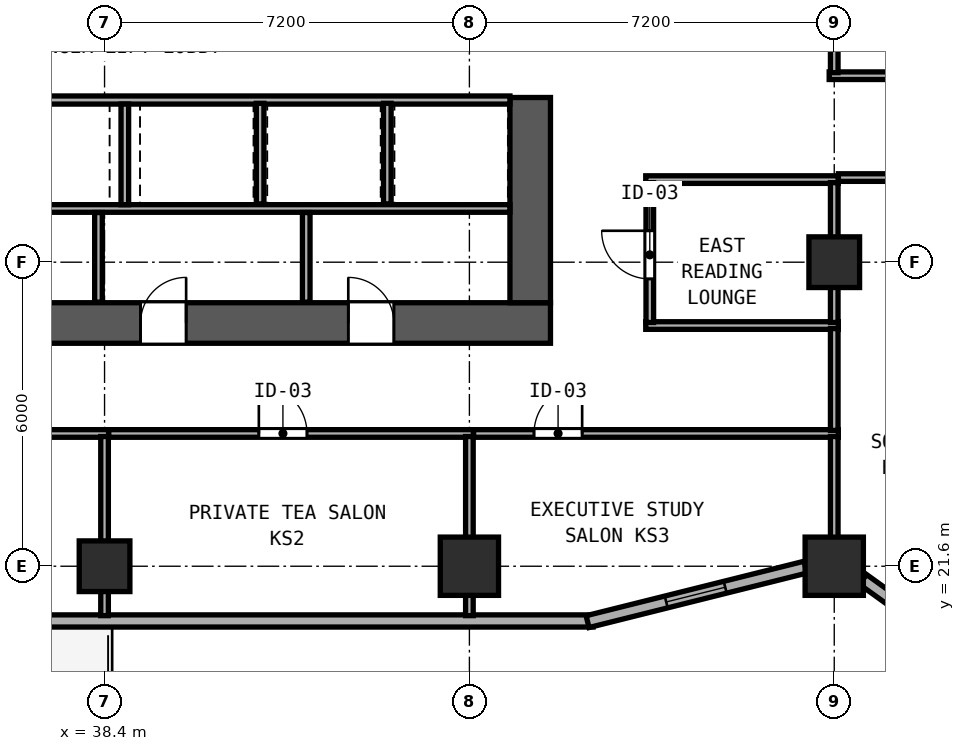
"""IFC4 building model, lengths in metres.
Left out: names, types, materials, properties, quantities, classifications, styles, units other than length and angle.
Written with IfcOpenShell. Run it as: python <this file> out.ifc"""

import sys

from ifc_helpers import new_model, si_unit, direction, frame, frame_2d, origin, origin_2d, place, context, subcontext, project, spatial, rectangle, hollow_rectangle, extrude, element, fill, save


model = new_model("IFC4")
c1 = context("Model", 3, precision=1e-05, world=origin(), true_north=direction((0.0, 1.0)))
c2 = subcontext(c1, "Body", "Model", "MODEL_VIEW")
j1 = project(units=[si_unit("LENGTHUNIT", "METRE"), si_unit("PLANEANGLEUNIT", "RADIAN")], contexts=[c1])
p1 = place(None, origin())
s1 = spatial("IfcSite", under=j1, at=p1, CompositionType="ELEMENT")
p2 = place(p1, origin())
s2 = spatial("IfcBuilding", under=s1, at=p2, CompositionType="ELEMENT")
p3 = place(p2, frame((0.0, 0.0, 55.2)))
s3 = spatial("IfcBuildingStorey", under=s2, at=p3, CompositionType="ELEMENT", Elevation=55.2)
p4 = place(p3, frame((29.6, 26.4, 0.0), z_axis=(0.0, 0.0, 1.0), x_axis=(1.0, 0.0, 0.0)))
e1 = element("IfcWall", 1, at=p4, inside=s3, PredefinedType="SHEAR", context=c2, shape_type="SweptSolid", body=[
    extrude(rectangle(XDim=17.6, YDim=0.8, at=frame_2d((8.8, 0.0))), origin(), (0.0, 0.0, 1.0), 3.6),
])
p5 = place(p4, frame((2.47, 0.0, 0.0), z_axis=(0.0, 0.0, 1.0), x_axis=(-1.0, 0.0, 0.0)))
e2 = element("IfcOpeningElement", 2, at=p5, cuts=e1, PredefinedType="OPENING", context=c2, shape_type="SweptSolid", body=[
    extrude(rectangle(XDim=0.9, YDim=2.1, at=frame_2d((0.45, 1.05))), frame((0.0, 0.41, 0.0), z_axis=(0.0, -1.0, 0.0), x_axis=(1.0, 0.0, 0.0)), (0.0, 0.0, 1.0), 0.82),
])
p6 = place(p4, frame((6.31, 0.0, 0.0), z_axis=(0.0, 0.0, 1.0), x_axis=(-1.0, 0.0, 0.0)))
e3 = element("IfcOpeningElement", 3, at=p6, cuts=e1, PredefinedType="OPENING", context=c2, shape_type="SweptSolid", body=[
    extrude(rectangle(XDim=0.9, YDim=2.1, at=frame_2d((0.45, 1.05))), frame((0.0, 0.41, 0.0), z_axis=(0.0, -1.0, 0.0), x_axis=(1.0, 0.0, 0.0)), (0.0, 0.0, 1.0), 0.82),
])
p7 = place(p4, frame((10.41, 0.0, 0.0), z_axis=(0.0, 0.0, 1.0), x_axis=(-1.0, 0.0, 0.0)))
e4 = element("IfcOpeningElement", 4, at=p7, cuts=e1, PredefinedType="OPENING", context=c2, shape_type="SweptSolid", body=[
    extrude(rectangle(XDim=0.9, YDim=2.1, at=frame_2d((0.45, 1.05))), frame((0.0, 0.41, 0.0), z_axis=(0.0, -1.0, 0.0), x_axis=(1.0, 0.0, 0.0)), (0.0, 0.0, 1.0), 0.82),
])
p8 = place(p4, frame((14.51, 0.0, 0.0), z_axis=(0.0, 0.0, 1.0), x_axis=(-1.0, 0.0, 0.0)))
e5 = element("IfcOpeningElement", 5, at=p8, cuts=e1, PredefinedType="OPENING", context=c2, shape_type="SweptSolid", body=[
    extrude(rectangle(XDim=0.9, YDim=2.1, at=frame_2d((0.45, 1.05))), frame((0.0, 0.41, 0.0), z_axis=(0.0, -1.0, 0.0), x_axis=(1.0, 0.0, 0.0)), (0.0, 0.0, 1.0), 0.82),
])
p9 = place(p3, frame((46.8, 26.8, 0.0), z_axis=(0.0, 0.0, 1.0), x_axis=(0.0, 1.0, 0.0)))
e6 = element("IfcWall", 6, at=p9, inside=s3, PredefinedType="SHEAR", context=c2, shape_type="SweptSolid", body=[
    extrude(rectangle(XDim=4.05, YDim=0.8, at=frame_2d((2.025, 0.0))), origin(), (0.0, 0.0, 1.0), 3.6),
])
for number, where, z_axis, x_axis in (
    (7, (52.8, 21.6, 0.0), (0.0, 0.0, 1.0), (1.0, 0.0, 0.0)),
    (8, (45.6, 21.6, 0.0), (0.0, 0.0, 1.0), (1.0, 0.0, 0.0)),
):
    element("IfcColumn", number, at=place(p3, frame(where, z_axis=z_axis, x_axis=x_axis)), inside=s3, PredefinedType="COLUMN", context=c2, shape_type="SweptSolid", body=[
        extrude(hollow_rectangle(XDim=1.15, YDim=1.15, WallThickness=0.042, at=origin_2d()), origin(), (0.0, 0.0, 1.0), 3.8),
    ])
for number, where, z_axis, x_axis in (
    (9, (52.8, 27.6, 0.0), (0.0, 0.0, 1.0), (1.0, 0.0, 0.0)),
    (10, (38.4, 21.6, 0.0), (0.0, 0.0, 1.0), (1.0, 0.0, 0.0)),
):
    element("IfcColumn", number, at=place(p3, frame(where, z_axis=z_axis, x_axis=x_axis)), inside=s3, PredefinedType="COLUMN", context=c2, shape_type="SweptSolid", body=[
        extrude(hollow_rectangle(XDim=1.0, YDim=1.0, WallThickness=0.038, at=origin_2d()), origin(), (0.0, 0.0, 1.0), 3.8),
    ])
p10 = place(p3, frame((28.76, 20.52, 0.0), z_axis=(0.0, 0.0, 1.0), x_axis=(1.0, 0.0, 0.0)))
e11 = element("IfcWall", 11, at=p10, inside=s3, PredefinedType="SOLIDWALL", context=c2, shape_type="SweptSolid", body=[
    extrude(rectangle(XDim=19.281, YDim=0.24, at=frame_2d((9.64, 0.0))), origin(), (0.0, 0.0, 1.0), 3.6),
])
p11 = place(p10, frame((4.84, 0.0, 0.0), z_axis=(0.0, 0.0, 1.0), x_axis=(-1.0, 0.0, 0.0)))
e12 = element("IfcOpeningElement", 12, at=p11, cuts=e11, PredefinedType="OPENING", context=c2, shape_type="SweptSolid", body=[
    extrude(rectangle(XDim=1.2, YDim=2.15, at=frame_2d((0.6, 1.075))), frame((0.0, 0.13, 0.0), z_axis=(0.0, -1.0, 0.0), x_axis=(1.0, 0.0, 0.0)), (0.0, 0.0, 1.0), 0.26),
])
p12 = place(p3, frame((47.932, 20.507, 0.0), z_axis=(0.0, 0.0, 1.0), x_axis=(0.970145739396, 0.242522667667, 0.0)))
e13 = element("IfcWall", 13, at=p12, inside=s3, PredefinedType="SOLIDWALL", context=c2, shape_type="SweptSolid", body=[
    extrude(rectangle(XDim=4.433, YDim=0.24, at=frame_2d((2.217, 0.0))), origin(), (0.0, 0.0, 1.0), 3.097),
])
p13 = place(p12, frame((1.6, 0.0, 0.85)))
e14 = element("IfcOpeningElement", 14, at=p13, cuts=e13, PredefinedType="OPENING", context=c2, shape_type="SweptSolid", body=[
    extrude(rectangle(XDim=1.2, YDim=1.85, at=frame_2d((0.6, 0.925))), frame((0.0, 0.13, 0.0), z_axis=(0.0, -1.0, 0.0), x_axis=(1.0, 0.0, 0.0)), (0.0, 0.0, 1.0), 0.26),
])
p14 = place(p3, frame((53.367, 21.34, 0.0), z_axis=(0.0, 0.0, 1.0), x_axis=(0.811543176492, -0.58429245476, 0.0)))
e15 = element("IfcWall", 15, at=p14, inside=s3, PredefinedType="SOLIDWALL", context=c2, shape_type="SweptSolid", body=[
    extrude(rectangle(XDim=11.531, YDim=0.24, at=frame_2d((5.765, 0.0))), origin(), (0.0, 0.0, 1.0), 3.097),
])
p15 = place(p14, frame((1.6, 0.0, 0.85)))
e16 = element("IfcOpeningElement", 16, at=p15, cuts=e15, PredefinedType="OPENING", context=c2, shape_type="SweptSolid", body=[
    extrude(rectangle(XDim=1.2, YDim=1.85, at=frame_2d((0.6, 0.925))), frame((0.0, 0.13, 0.0), z_axis=(0.0, -1.0, 0.0), x_axis=(1.0, 0.0, 0.0)), (0.0, 0.0, 1.0), 0.26),
])
p16 = place(p14, frame((7.0, 0.0, 0.85)))
e17 = element("IfcOpeningElement", 17, at=p16, cuts=e15, PredefinedType="OPENING", context=c2, shape_type="SweptSolid", body=[
    extrude(rectangle(XDim=1.2, YDim=1.85, at=frame_2d((0.6, 0.925))), frame((0.0, 0.13, 0.0), z_axis=(0.0, -1.0, 0.0), x_axis=(1.0, 0.0, 0.0)), (0.0, 0.0, 1.0), 0.26),
])
p17 = place(p14, frame((9.99, 0.0, 0.85)))
e18 = element("IfcOpeningElement", 18, at=p17, cuts=e15, PredefinedType="OPENING", context=c2, shape_type="SweptSolid", body=[
    extrude(rectangle(XDim=1.2, YDim=1.85, at=frame_2d((0.6, 0.925))), frame((0.0, 0.13, 0.0), z_axis=(0.0, -1.0, 0.0), x_axis=(1.0, 0.0, 0.0)), (0.0, 0.0, 1.0), 0.26),
])
p18 = place(p3, frame((30.4, 30.8, 0.0), z_axis=(0.0, 0.0, 1.0), x_axis=(1.0, 0.0, 0.0)))
e19 = element("IfcWall", 19, at=p18, inside=s3, PredefinedType="SOLIDWALL", context=c2, shape_type="SweptSolid", body=[
    extrude(rectangle(XDim=16.0, YDim=0.16, at=frame_2d((8.0, 0.0))), origin(), (0.0, 0.0, 1.0), 3.6),
])
p19 = place(p3, frame((30.4, 28.66, 0.0), z_axis=(0.0, 0.0, 1.0), x_axis=(1.0, 0.0, 0.0)))
e20 = element("IfcWall", 20, at=p19, inside=s3, PredefinedType="PARTITIONING", context=c2, shape_type="SweptSolid", body=[
    extrude(rectangle(XDim=16.0, YDim=0.15, at=frame_2d((8.0, 0.0))), origin(), (0.0, 0.0, 1.0), 3.6),
])
p20 = place(p3, frame((38.8, 28.735, 0.0), z_axis=(0.0, 0.0, 1.0), x_axis=(0.0, 1.0, 0.0)))
e21 = element("IfcWall", 21, at=p20, inside=s3, PredefinedType="SOLIDWALL", context=c2, shape_type="SweptSolid", body=[
    extrude(rectangle(XDim=1.985, YDim=0.15, at=frame_2d((0.992, 0.0))), origin(), (0.0, 0.0, 1.0), 3.6),
])
for number, where, z_axis, x_axis in (
    (22, (38.28, 26.81, 0.0), (0.0, 0.0, 1.0), (0.0, 1.0, 0.0)),
    (23, (42.38, 26.81, 0.0), (0.0, 0.0, 1.0), (0.0, 1.0, 0.0)),
):
    element("IfcWall", number, at=place(p3, frame(where, z_axis=z_axis, x_axis=x_axis)), inside=s3, PredefinedType="PARTITIONING", context=c2, shape_type="SweptSolid", body=[
        extrude(rectangle(XDim=1.77, YDim=0.15, at=frame_2d((0.885, 0.0))), origin(), (0.0, 0.0, 1.0), 3.6),
    ])
for number, where, z_axis, x_axis in (
    (24, (41.47, 28.75, 0.0), (0.0, 0.0, 1.0), (0.0, 1.0, 0.0)),
    (25, (43.98, 28.75, 0.0), (0.0, 0.0, 1.0), (0.0, 1.0, 0.0)),
):
    element("IfcWall", number, at=place(p3, frame(where, z_axis=z_axis, x_axis=x_axis)), inside=s3, PredefinedType="SOLIDWALL", context=c2, shape_type="SweptSolid", body=[
        extrude(rectangle(XDim=1.985, YDim=0.15, at=frame_2d((0.993, 0.0))), origin(), (0.0, 0.0, 1.0), 3.6),
    ])
for number, where, z_axis, x_axis in (
    (26, (49.08, 29.23, 0.0), (0.0, 0.0, 1.0), (1.0, 0.0, 0.0)),
    (27, (49.08, 26.35, 0.0), (0.0, 0.0, 1.0), (1.0, 0.0, 0.0)),
):
    element("IfcWall", number, at=place(p3, frame(where, z_axis=z_axis, x_axis=x_axis)), inside=s3, PredefinedType="PARTITIONING", context=c2, shape_type="SweptSolid", body=[
        extrude(rectangle(XDim=3.8, YDim=0.15, at=frame_2d((1.9, 0.0))), origin(), (0.0, 0.0, 1.0), 3.6),
    ])
p21 = place(p3, frame((49.16, 26.41, 0.0), z_axis=(0.0, 0.0, 1.0), x_axis=(0.0, 1.0, 0.0)))
e28 = element("IfcWall", 28, at=p21, inside=s3, PredefinedType="PARTITIONING", context=c2, shape_type="SweptSolid", body=[
    extrude(rectangle(XDim=2.76, YDim=0.15, at=frame_2d((1.38, 0.0))), origin(), (0.0, 0.0, 1.0), 3.6),
])
p22 = place(p21, frame((0.86, 0.0, 0.0)))
e29 = element("IfcOpeningElement", 29, at=p22, cuts=e28, PredefinedType="OPENING", context=c2, shape_type="SweptSolid", body=[
    extrude(rectangle(XDim=0.95, YDim=2.12, at=frame_2d((0.475, 1.06))), frame((0.0, 0.085, 0.0), z_axis=(0.0, -1.0, 0.0), x_axis=(1.0, 0.0, 0.0)), (0.0, 0.0, 1.0), 0.17),
])
p23 = place(p3, frame((52.8, 26.41, 0.0), z_axis=(0.0, 0.0, 1.0), x_axis=(0.0, 1.0, 0.0)))
e30 = element("IfcWall", 30, at=p23, inside=s3, PredefinedType="PARTITIONING", context=c2, shape_type="SweptSolid", body=[
    extrude(rectangle(XDim=2.76, YDim=0.15, at=frame_2d((1.38, 0.0))), origin(), (0.0, 0.0, 1.0), 3.097),
])
p24 = place(p3, frame((23.92, 24.22, 0.0), z_axis=(0.0, 0.0, 1.0), x_axis=(1.0, 0.0, 0.0)))
e31 = element("IfcWall", 31, at=p24, inside=s3, PredefinedType="PARTITIONING", context=c2, shape_type="SweptSolid", body=[
    extrude(rectangle(XDim=14.56, YDim=0.15, at=frame_2d((7.28, 0.0))), origin(), (0.0, 0.0, 1.0), 3.6),
])
p25 = place(p24, frame((9.445, 0.0, 0.0), z_axis=(0.0, 0.0, 1.0), x_axis=(-1.0, 0.0, 0.0)))
e32 = element("IfcOpeningElement", 32, at=p25, cuts=e31, PredefinedType="OPENING", context=c2, shape_type="SweptSolid", body=[
    extrude(rectangle(XDim=0.95, YDim=2.12, at=frame_2d((0.475, 1.06))), frame((0.0, 0.085, 0.0), z_axis=(0.0, -1.0, 0.0), x_axis=(1.0, 0.0, 0.0)), (0.0, 0.0, 1.0), 0.17),
])
p26 = place(p3, frame((38.4, 20.625, 0.0), z_axis=(0.0, 0.0, 1.0), x_axis=(0.0, 1.0, 0.0)))
e33 = element("IfcWall", 33, at=p26, inside=s3, PredefinedType="PARTITIONING", context=c2, shape_type="SweptSolid", body=[
    extrude(rectangle(XDim=3.535, YDim=0.15, at=frame_2d((1.768, 0.0))), origin(), (0.0, 0.0, 1.0), 2.985),
])
p27 = place(p3, frame((38.482, 24.22, 0.0), z_axis=(0.0, 0.0, 1.0), x_axis=(1.0, 0.0, 0.0)))
e34 = element("IfcWall", 34, at=p27, inside=s3, PredefinedType="PARTITIONING", context=c2, shape_type="SweptSolid", body=[
    extrude(rectangle(XDim=7.198, YDim=0.15, at=frame_2d((3.599, 0.0))), origin(), (0.0, 0.0, 1.0), 3.6),
])
p28 = place(p27, frame((3.913, 0.0, 0.0), z_axis=(0.0, 0.0, 1.0), x_axis=(-1.0, 0.0, 0.0)))
e35 = element("IfcOpeningElement", 35, at=p28, cuts=e34, PredefinedType="OPENING", context=c2, shape_type="SweptSolid", body=[
    extrude(rectangle(XDim=0.95, YDim=2.12, at=frame_2d((0.475, 1.06))), frame((0.0, 0.085, 0.0), z_axis=(0.0, -1.0, 0.0), x_axis=(1.0, 0.0, 0.0)), (0.0, 0.0, 1.0), 0.17),
])
p29 = place(p3, frame((45.6, 20.625, 0.0), z_axis=(0.0, 0.0, 1.0), x_axis=(0.0, 1.0, 0.0)))
e36 = element("IfcWall", 36, at=p29, inside=s3, PredefinedType="PARTITIONING", context=c2, shape_type="SweptSolid", body=[
    extrude(rectangle(XDim=3.535, YDim=0.15, at=frame_2d((1.768, 0.0))), origin(), (0.0, 0.0, 1.0), 2.985),
])
p30 = place(p3, frame((45.682, 24.22, 0.0), z_axis=(0.0, 0.0, 1.0), x_axis=(1.0, 0.0, 0.0)))
e37 = element("IfcWall", 37, at=p30, inside=s3, PredefinedType="PARTITIONING", context=c2, shape_type="SweptSolid", body=[
    extrude(rectangle(XDim=7.198, YDim=0.15, at=frame_2d((3.599, 0.0))), origin(), (0.0, 0.0, 1.0), 3.6),
])
p31 = place(p30, frame((2.143, 0.0, 0.0), z_axis=(0.0, 0.0, 1.0), x_axis=(-1.0, 0.0, 0.0)))
e38 = element("IfcOpeningElement", 38, at=p31, cuts=e37, PredefinedType="OPENING", context=c2, shape_type="SweptSolid", body=[
    extrude(rectangle(XDim=0.95, YDim=2.12, at=frame_2d((0.475, 1.06))), frame((0.0, 0.085, 0.0), z_axis=(0.0, -1.0, 0.0), x_axis=(1.0, 0.0, 0.0)), (0.0, 0.0, 1.0), 0.17),
])
p32 = place(p3, frame((52.8, 21.819, 0.0), z_axis=(0.0, 0.0, 1.0), x_axis=(0.0, 1.0, 0.0)))
e39 = element("IfcWall", 39, at=p32, inside=s3, PredefinedType="PARTITIONING", context=c2, shape_type="SweptSolid", body=[
    extrude(rectangle(XDim=2.341, YDim=0.15, at=frame_2d((1.171, 0.0))), origin(), (0.0, 0.0, 1.0), 3.097),
])
p33 = place(p3, frame((52.7, 31.28, 0.0), z_axis=(0.0, 0.0, 1.0), x_axis=(1.0, 0.0, 0.0)))
e40 = element("IfcWall", 40, at=p33, inside=s3, PredefinedType="PARTITIONING", context=c2, shape_type="SweptSolid", body=[
    extrude(rectangle(XDim=4.59, YDim=0.15, at=frame_2d((2.295, 0.0))), origin(), (0.0, 0.0, 1.0), 3.6),
])
p34 = place(p33, frame((3.361, 0.0, 0.0)))
e41 = element("IfcOpeningElement", 41, at=p34, cuts=e40, PredefinedType="OPENING", context=c2, shape_type="SweptSolid", body=[
    extrude(rectangle(XDim=0.95, YDim=2.15, at=frame_2d((0.475, 1.075))), frame((0.0, 0.085, 0.0), z_axis=(0.0, -1.0, 0.0), x_axis=(1.0, 0.0, 0.0)), (0.0, 0.0, 1.0), 0.17),
])
p35 = place(p3, frame((52.8, 31.34, 0.0), z_axis=(0.0, 0.0, 1.0), x_axis=(0.0, 1.0, 0.0)))
e42 = element("IfcWall", 42, at=p35, inside=s3, PredefinedType="PARTITIONING", context=c2, shape_type="SweptSolid", body=[
    extrude(rectangle(XDim=1.6, YDim=0.15, at=frame_2d((0.8, 0.0))), origin(), (0.0, 0.0, 1.0), 3.097),
])
p36 = place(p3, frame((52.882, 29.27, 0.0), z_axis=(0.0, 0.0, 1.0), x_axis=(1.0, 0.0, 0.0)))
e43 = element("IfcWall", 43, at=p36, inside=s3, PredefinedType="PARTITIONING", context=c2, shape_type="SweptSolid", body=[
    extrude(rectangle(XDim=4.288, YDim=0.15, at=frame_2d((2.144, 0.0))), origin(), (0.0, 0.0, 1.0), 3.6),
])
p37 = place(p36, frame((4.02, 0.0, 0.0), z_axis=(0.0, 0.0, 1.0), x_axis=(-1.0, 0.0, 0.0)))
e44 = element("IfcOpeningElement", 44, at=p37, cuts=e43, PredefinedType="OPENING", context=c2, shape_type="SweptSolid", body=[
    extrude(rectangle(XDim=0.95, YDim=2.15, at=frame_2d((0.475, 1.075))), frame((0.0, 0.085, 0.0), z_axis=(0.0, -1.0, 0.0), x_axis=(1.0, 0.0, 0.0)), (0.0, 0.0, 1.0), 0.17),
])
p38 = place(p3, frame((52.8, 24.28, 0.0), z_axis=(0.0, 0.0, 1.0), x_axis=(0.0, 1.0, 0.0)))
e45 = element("IfcWall", 45, at=p38, inside=s3, PredefinedType="PARTITIONING", context=c2, shape_type="SweptSolid", body=[
    extrude(rectangle(XDim=2.01, YDim=0.15, at=frame_2d((1.005, 0.0))), origin(), (0.0, 0.0, 1.0), 3.097),
])
p39 = place(p13, origin())
e46 = element("IfcWindow", 46, at=p39, inside=s3, PartitioningType="SINGLE_PANEL", PredefinedType="WINDOW", context=c2, shape_type="SweptSolid", body=[
    extrude(rectangle(XDim=1.2, YDim=1.85, at=frame_2d((0.6, 0.925))), frame((0.0, 0.03, 0.0), z_axis=(0.0, -1.0, 0.0), x_axis=(1.0, 0.0, 0.0)), (0.0, 0.0, 1.0), 0.06),
])
fill(e14, e46)
p40 = place(p7, origin())
e47 = element("IfcDoor", 47, at=p40, inside=s3, OperationType="SINGLE_SWING_LEFT", PredefinedType="DOOR", context=c2, shape_type="SweptSolid", body=[
    extrude(rectangle(XDim=0.9, YDim=2.1, at=frame_2d((0.45, 1.05))), frame((0.0, -0.195, 0.0), z_axis=(0.0, -1.0, 0.0), x_axis=(1.0, 0.0, 0.0)), (0.0, 0.0, 1.0), 0.05),
])
fill(e4, e47)
p41 = place(p8, origin())
e48 = element("IfcDoor", 48, at=p41, inside=s3, OperationType="SINGLE_SWING_RIGHT", PredefinedType="DOOR", context=c2, shape_type="SweptSolid", body=[
    extrude(rectangle(XDim=0.9, YDim=2.1, at=frame_2d((0.45, 1.05))), frame((0.0, -0.195, 0.0), z_axis=(0.0, -1.0, 0.0), x_axis=(1.0, 0.0, 0.0)), (0.0, 0.0, 1.0), 0.05),
])
fill(e5, e48)
p42 = place(p22, origin())
e49 = element("IfcDoor", 49, at=p42, inside=s3, OperationType="SINGLE_SWING_RIGHT", PredefinedType="DOOR", context=c2, shape_type="SweptSolid", body=[
    extrude(rectangle(XDim=0.95, YDim=2.12, at=frame_2d((0.475, 1.06))), frame((0.0, 0.025, 0.0), z_axis=(0.0, -1.0, 0.0), x_axis=(1.0, 0.0, 0.0)), (0.0, 0.0, 1.0), 0.05),
])
fill(e29, e49)
p43 = place(p28, origin())
e50 = element("IfcDoor", 50, at=p43, inside=s3, OperationType="SINGLE_SWING_RIGHT", PredefinedType="DOOR", context=c2, shape_type="SweptSolid", body=[
    extrude(rectangle(XDim=0.95, YDim=2.12, at=frame_2d((0.475, 1.06))), frame((0.0, 0.025, 0.0), z_axis=(0.0, -1.0, 0.0), x_axis=(1.0, 0.0, 0.0)), (0.0, 0.0, 1.0), 0.05),
])
fill(e35, e50)
p44 = place(p31, origin())
e51 = element("IfcDoor", 51, at=p44, inside=s3, OperationType="SINGLE_SWING_LEFT", PredefinedType="DOOR", context=c2, shape_type="SweptSolid", body=[
    extrude(rectangle(XDim=0.95, YDim=2.12, at=frame_2d((0.475, 1.06))), frame((0.0, 0.025, 0.0), z_axis=(0.0, -1.0, 0.0), x_axis=(1.0, 0.0, 0.0)), (0.0, 0.0, 1.0), 0.05),
])
fill(e38, e51)
save(model, sys.argv[1])
